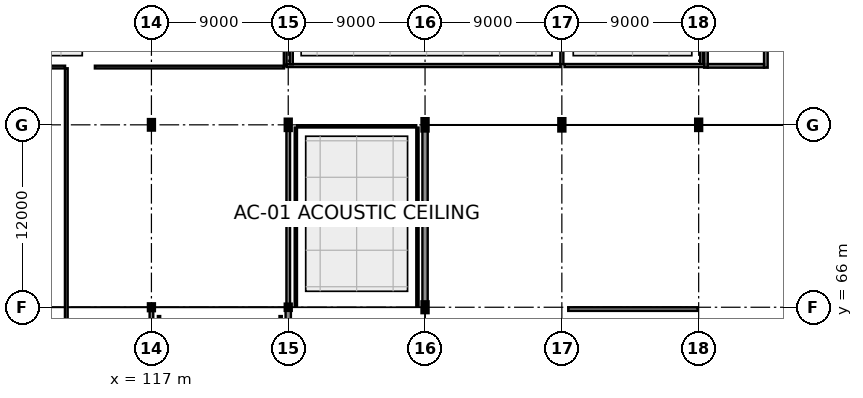
"""IFC4 building model, lengths in metres.
Left out: names, types, materials, properties, quantities, classifications, styles, units other than length and angle.
Written with IfcOpenShell. Run it as: python <this file> out.ifc"""

import sys

from ifc_helpers import new_model, si_unit, direction, frame, frame_2d, origin, origin_2d, place, context, subcontext, project, spatial, rectangle, i_section, extrude, element, fill, save


model = new_model("IFC4")
c1 = context("Model", 3, precision=1e-05, world=origin(), true_north=direction((0.0, 1.0)))
c2 = subcontext(c1, "Body", "Model", "MODEL_VIEW")
j1 = project(units=[si_unit("LENGTHUNIT", "METRE"), si_unit("PLANEANGLEUNIT", "RADIAN")], contexts=[c1])
p1 = place(None, origin())
s1 = spatial("IfcSite", under=j1, at=p1, CompositionType="ELEMENT")
p2 = place(p1, origin())
s2 = spatial("IfcBuilding", under=s1, at=p2, CompositionType="ELEMENT")
p3 = place(p2, origin())
s3 = spatial("IfcBuildingStorey", under=s2, at=p3, CompositionType="ELEMENT", Elevation=0.0)
p4 = place(p3, frame((117.0, 66.0, 0.0), z_axis=(0.0, 0.0, 1.0), x_axis=(1.0, 0.0, 0.0)))
e1 = element("IfcColumn", 1, at=p4, inside=s3, PredefinedType="COLUMN", context=c2, shape_type="SweptSolid", body=[
    extrude(i_section(OverallWidth=0.3, OverallDepth=0.36, WebThickness=0.012, FlangeThickness=0.022, at=origin_2d()), origin(), (0.0, 0.0, 1.0), 5.4),
])
p5 = place(p3, frame((117.0, 78.0, 0.0), z_axis=(0.0, 0.0, 1.0), x_axis=(1.0, 0.0, 0.0)))
e2 = element("IfcColumn", 2, at=p5, inside=s3, PredefinedType="COLUMN", context=c2, shape_type="SweptSolid", body=[
    extrude(i_section(OverallWidth=0.3, OverallDepth=0.6, WebThickness=0.015, FlangeThickness=0.03, at=origin_2d()), origin(), (0.0, 0.0, 1.0), 5.4),
])
p6 = place(p3, frame((126.0, 66.0, 0.0), z_axis=(0.0, 0.0, 1.0), x_axis=(0.0, 1.0, 0.0)))
e3 = element("IfcColumn", 3, at=p6, inside=s3, PredefinedType="COLUMN", context=c2, shape_type="SweptSolid", body=[
    extrude(i_section(OverallWidth=0.3, OverallDepth=0.32, WebThickness=0.011, FlangeThickness=0.021, at=origin_2d()), origin(), (0.0, 0.0, 1.0), 5.4),
])
p7 = place(p3, frame((126.0, 78.0, 0.0), z_axis=(0.0, 0.0, 1.0), x_axis=(1.0, 0.0, 0.0)))
e4 = element("IfcColumn", 4, at=p7, inside=s3, PredefinedType="COLUMN", context=c2, shape_type="SweptSolid", body=[
    extrude(i_section(OverallWidth=0.3, OverallDepth=0.65, WebThickness=0.016, FlangeThickness=0.031, at=origin_2d()), origin(), (0.0, 0.0, 1.0), 5.4),
])
p8 = place(p3, frame((135.0, 66.0, 0.0), z_axis=(0.0, 0.0, 1.0), x_axis=(1.0, 0.0, 0.0)))
e5 = element("IfcColumn", 5, at=p8, inside=s3, PredefinedType="COLUMN", context=c2, shape_type="SweptSolid", body=[
    extrude(i_section(OverallWidth=0.305, OverallDepth=0.62, WebThickness=0.021, FlangeThickness=0.04, at=origin_2d()), origin(), (0.0, 0.0, 1.0), 5.4),
])
for number, where, z_axis, x_axis in (
    (6, (135.0, 78.0, 0.0), (0.0, 0.0, 1.0), (1.0, 0.0, 0.0)),
    (7, (144.0, 78.0, 0.0), (0.0, 0.0, 1.0), (1.0, 0.0, 0.0)),
):
    element("IfcColumn", number, at=place(p3, frame(where, z_axis=z_axis, x_axis=x_axis)), inside=s3, PredefinedType="COLUMN", context=c2, shape_type="SweptSolid", body=[
        extrude(i_section(OverallWidth=0.304, OverallDepth=0.716, WebThickness=0.021, FlangeThickness=0.04, at=origin_2d()), origin(), (0.0, 0.0, 1.0), 5.4),
    ])
p9 = place(p3, frame((153.0, 78.0, 0.0), z_axis=(0.0, 0.0, 1.0), x_axis=(0.0, 1.0, 0.0)))
e8 = element("IfcColumn", 8, at=p9, inside=s3, PredefinedType="COLUMN", context=c2, shape_type="SweptSolid", body=[
    extrude(i_section(OverallWidth=0.3, OverallDepth=0.65, WebThickness=0.016, FlangeThickness=0.031, at=origin_2d()), origin(), (0.0, 0.0, 1.0), 5.4),
])
p10 = place(p3, frame((135.0, 66.308, 0.0), z_axis=(0.0, 0.0, 1.0), x_axis=(0.0, 1.0, 0.0)))
e9 = element("IfcWall", 9, at=p10, inside=s3, PredefinedType="SOLIDWALL", context=c2, shape_type="SweptSolid", body=[
    extrude(rectangle(XDim=11.336, YDim=0.35, at=frame_2d((5.668, 0.0))), origin(), (0.0, 0.0, 1.0), 4.545),
])
p11 = place(p10, frame((4.218, 0.0, 0.65)))
e10 = element("IfcOpeningElement", 10, at=p11, cuts=e9, PredefinedType="OPENING", context=c2, shape_type="SweptSolid", body=[
    extrude(rectangle(XDim=2.9, YDim=2.9, at=frame_2d((1.45, 1.45))), frame((0.0, 0.19, 0.0), z_axis=(0.0, -1.0, 0.0), x_axis=(1.0, 0.0, 0.0)), (0.0, 0.0, 1.0), 0.38),
])
p12 = place(p3, frame((126.0, 54.158, 0.0), z_axis=(0.0, 0.0, 1.0), x_axis=(0.0, 1.0, 0.0)))
e11 = element("IfcWall", 11, at=p12, inside=s3, PredefinedType="SOLIDWALL", context=c2, shape_type="SweptSolid", body=[
    extrude(rectangle(XDim=11.834, YDim=0.35, at=frame_2d((5.917, 0.0))), origin(), (0.0, 0.0, 1.0), 4.605),
])
p13 = place(p3, frame((144.42, 65.88, 0.0), z_axis=(0.0, 0.0, 1.0), x_axis=(1.0, 0.0, 0.0)))
e12 = element("IfcWall", 12, at=p13, inside=s3, PredefinedType="PARAPET", context=c2, shape_type="SweptSolid", body=[
    extrude(rectangle(XDim=8.52, YDim=0.24, at=frame_2d((4.26, 0.0))), origin(), (0.0, 0.0, 1.0), 0.9),
])
p14 = place(p3, frame((153.48, 81.76, 0.0), z_axis=(0.0, 0.0, 1.0), x_axis=(0.0, 1.0, 0.0)))
e13 = element("IfcWall", 13, at=p14, inside=s3, PredefinedType="SHEAR", context=c2, shape_type="SweptSolid", body=[
    extrude(rectangle(XDim=8.28, YDim=0.24, at=frame_2d((4.14, 0.0))), origin(), (0.0, 0.0, 1.0), 5.21),
])
p15 = place(p3, frame((157.42, 81.76, 0.0), z_axis=(0.0, 0.0, 1.0), x_axis=(0.0, 1.0, 0.0)))
e14 = element("IfcWall", 14, at=p15, inside=s3, PredefinedType="SHEAR", context=c2, shape_type="SweptSolid", body=[
    extrude(rectangle(XDim=8.28, YDim=0.24, at=frame_2d((4.14, 0.0))), origin(), (0.0, 0.0, 1.0), 5.21),
])
p16 = place(p15, frame((0.49, 0.0, 0.0)))
e15 = element("IfcOpeningElement", 15, at=p16, cuts=e14, PredefinedType="OPENING", context=c2, shape_type="SweptSolid", body=[
    extrude(rectangle(XDim=1.3, YDim=2.2, at=frame_2d((0.65, 1.1))), frame((0.0, 0.135, 0.0), z_axis=(0.0, -1.0, 0.0), x_axis=(1.0, 0.0, 0.0)), (0.0, 0.0, 1.0), 0.27),
])
p17 = place(p3, frame((153.6, 81.88, 0.0), z_axis=(0.0, 0.0, 1.0), x_axis=(1.0, 0.0, 0.0)))
e16 = element("IfcWall", 16, at=p17, inside=s3, PredefinedType="SHEAR", context=c2, shape_type="SweptSolid", body=[
    extrude(rectangle(XDim=3.7, YDim=0.24, at=frame_2d((1.85, 0.0))), origin(), (0.0, 0.0, 1.0), 5.21),
])
p18 = place(p3, frame((126.0, 66.008, 0.0), z_axis=(0.0, 0.0, 1.0), x_axis=(0.0, 1.0, 0.0)))
e17 = element("IfcWall", 17, at=p18, inside=s3, PredefinedType="SHEAR", context=c2, shape_type="SweptSolid", body=[
    extrude(rectangle(XDim=11.669, YDim=0.24, at=frame_2d((5.834, 0.0))), origin(), (0.0, 0.0, 1.0), 4.605),
])
p19 = place(p3, frame((117.0, 54.148, 0.0), z_axis=(0.0, 0.0, 1.0), x_axis=(0.0, 1.0, 0.0)))
e18 = element("IfcWall", 18, at=p19, inside=s3, PredefinedType="SHEAR", context=c2, shape_type="SweptSolid", body=[
    extrude(rectangle(XDim=11.674, YDim=0.24, at=frame_2d((5.837, 0.0))), origin(), (0.0, 0.0, 1.0), 4.675),
])
p20 = place(p3, frame((99.125, 81.8, 0.0), z_axis=(0.0, 0.0, 1.0), x_axis=(1.0, 0.0, 0.0)))
e19 = element("IfcWall", 19, at=p20, inside=s3, PredefinedType="PARTITIONING", context=c2, shape_type="SweptSolid", body=[
    extrude(rectangle(XDim=12.195, YDim=0.18, at=frame_2d((6.098, 0.0))), origin(), (0.0, 0.0, 1.0), 5.04),
])
p21 = place(p20, frame((5.248, 0.0, 0.0)))
e20 = element("IfcOpeningElement", 20, at=p21, cuts=e19, PredefinedType="OPENING", context=c2, shape_type="SweptSolid", body=[
    extrude(rectangle(XDim=1.7, YDim=2.4, at=frame_2d((0.85, 1.2))), frame((0.0, 0.105, 0.0), z_axis=(0.0, -1.0, 0.0), x_axis=(1.0, 0.0, 0.0)), (0.0, 0.0, 1.0), 0.21),
])
p22 = place(p20, frame((9.245, 0.0, 1.05)))
e21 = element("IfcOpeningElement", 21, at=p22, cuts=e19, PredefinedType="OPENING", context=c2, shape_type="SweptSolid", body=[
    extrude(rectangle(XDim=2.1, YDim=1.2, at=frame_2d((1.05, 0.6))), frame((0.0, 0.105, 0.0), z_axis=(0.0, -1.0, 0.0), x_axis=(1.0, 0.0, 0.0)), (0.0, 0.0, 1.0), 0.21),
])
p23 = place(p3, frame((111.4, 81.72, 0.0), z_axis=(0.0, 0.0, 1.0), x_axis=(0.0, -1.0, 0.0)))
e22 = element("IfcWall", 22, at=p23, inside=s3, PredefinedType="PARTITIONING", context=c2, shape_type="SweptSolid", body=[
    extrude(rectangle(XDim=23.64, YDim=0.18, at=frame_2d((11.82, 0.0))), origin(), (0.0, 0.0, 1.0), 5.04),
])
p24 = place(p23, frame((11.095, 0.0, 0.0)))
e23 = element("IfcOpeningElement", 23, at=p24, cuts=e22, PredefinedType="OPENING", context=c2, shape_type="SweptSolid", body=[
    extrude(rectangle(XDim=1.45, YDim=2.2, at=frame_2d((0.725, 1.1))), frame((0.0, 0.105, 0.0), z_axis=(0.0, -1.0, 0.0), x_axis=(1.0, 0.0, 0.0)), (0.0, 0.0, 1.0), 0.21),
])
p25 = place(p3, frame((125.72, 81.8, 0.0), z_axis=(0.0, 0.0, 1.0), x_axis=(-1.0, 0.0, 0.0)))
e24 = element("IfcWall", 24, at=p25, inside=s3, PredefinedType="PARTITIONING", context=c2, shape_type="SweptSolid", body=[
    extrude(rectangle(XDim=12.44, YDim=0.18, at=frame_2d((6.22, 0.0))), origin(), (0.0, 0.0, 1.0), 5.04),
])
p26 = place(p25, frame((5.495, 0.0, 0.0)))
e25 = element("IfcOpeningElement", 25, at=p26, cuts=e24, PredefinedType="OPENING", context=c2, shape_type="SweptSolid", body=[
    extrude(rectangle(XDim=1.45, YDim=2.2, at=frame_2d((0.725, 1.1))), frame((0.0, 0.105, 0.0), z_axis=(0.0, -1.0, 0.0), x_axis=(1.0, 0.0, 0.0)), (0.0, 0.0, 1.0), 0.21),
])
p27 = place(p3, frame((125.8, 83.92, 0.0), z_axis=(0.0, 0.0, 1.0), x_axis=(0.0, -1.0, 0.0)))
e26 = element("IfcWall", 26, at=p27, inside=s3, PredefinedType="PARTITIONING", context=c2, shape_type="SweptSolid", body=[
    extrude(rectangle(XDim=2.04, YDim=0.18, at=frame_2d((1.02, 0.0))), origin(), (0.0, 0.0, 1.0), 4.445),
])
p28 = place(p3, frame((144.0, 95.62, 0.0), z_axis=(0.0, 0.0, 1.0), x_axis=(0.0, -1.0, 0.0)))
e27 = element("IfcWall", 27, at=p28, inside=s3, PredefinedType="PARTITIONING", context=c2, shape_type="SweptSolid", body=[
    extrude(rectangle(XDim=13.64, YDim=0.2, at=frame_2d((6.82, 0.0))), origin(), (0.0, 0.0, 1.0), 4.405),
])
p29 = place(p3, frame((143.92, 81.9, 0.0), z_axis=(0.0, 0.0, 1.0), x_axis=(-1.0, 0.0, 0.0)))
e28 = element("IfcWall", 28, at=p29, inside=s3, PredefinedType="PARTITIONING", context=c2, shape_type="SweptSolid", body=[
    extrude(rectangle(XDim=18.035, YDim=0.2, at=frame_2d((9.018, 0.0))), origin(), (0.0, 0.0, 1.0), 5.04),
])
p30 = place(p29, frame((8.017, 0.0, 0.0)))
e29 = element("IfcOpeningElement", 29, at=p30, cuts=e28, PredefinedType="OPENING", context=c2, shape_type="SweptSolid", body=[
    extrude(rectangle(XDim=2.0, YDim=2.6, at=frame_2d((1.0, 1.3))), frame((0.0, 0.115, 0.0), z_axis=(0.0, -1.0, 0.0), x_axis=(1.0, 0.0, 0.0)), (0.0, 0.0, 1.0), 0.23),
])
p31 = place(p29, frame((15.385, 0.0, 1.05)))
e30 = element("IfcOpeningElement", 30, at=p31, cuts=e28, PredefinedType="OPENING", context=c2, shape_type="SweptSolid", body=[
    extrude(rectangle(XDim=1.8, YDim=1.1, at=frame_2d((0.9, 0.55))), frame((0.0, 0.115, 0.0), z_axis=(0.0, -1.0, 0.0), x_axis=(1.0, 0.0, 0.0)), (0.0, 0.0, 1.0), 0.23),
])
p32 = place(p3, frame((126.2, 81.98, 0.0), z_axis=(0.0, 0.0, 1.0), x_axis=(0.0, 1.0, 0.0)))
e31 = element("IfcWall", 31, at=p32, inside=s3, PredefinedType="PARTITIONING", context=c2, shape_type="SweptSolid", body=[
    extrude(rectangle(XDim=13.64, YDim=0.2, at=frame_2d((6.82, 0.0))), origin(), (0.0, 0.0, 1.0), 4.445),
])
p33 = place(p3, frame((153.2, 95.62, 0.0), z_axis=(0.0, 0.0, 1.0), x_axis=(0.0, -1.0, 0.0)))
e32 = element("IfcWall", 32, at=p33, inside=s3, PredefinedType="PARTITIONING", context=c2, shape_type="SweptSolid", body=[
    extrude(rectangle(XDim=13.64, YDim=0.2, at=frame_2d((6.82, 0.0))), origin(), (0.0, 0.0, 1.0), 4.305),
])
p34 = place(p3, frame((153.365, 81.9, 0.0), z_axis=(0.0, 0.0, 1.0), x_axis=(-1.0, 0.0, 0.0)))
e33 = element("IfcWall", 33, at=p34, inside=s3, PredefinedType="PARTITIONING", context=c2, shape_type="SweptSolid", body=[
    extrude(rectangle(XDim=9.185, YDim=0.2, at=frame_2d((4.593, 0.0))), origin(), (0.0, 0.0, 1.0), 5.04),
])
p35 = place(p34, frame((3.643, 0.0, 0.0)))
e34 = element("IfcOpeningElement", 34, at=p35, cuts=e33, PredefinedType="OPENING", context=c2, shape_type="SweptSolid", body=[
    extrude(rectangle(XDim=1.9, YDim=2.5, at=frame_2d((0.95, 1.25))), frame((0.0, 0.115, 0.0), z_axis=(0.0, -1.0, 0.0), x_axis=(1.0, 0.0, 0.0)), (0.0, 0.0, 1.0), 0.23),
])
p36 = place(p34, frame((6.835, 0.0, 1.05)))
e35 = element("IfcOpeningElement", 35, at=p36, cuts=e33, PredefinedType="OPENING", context=c2, shape_type="SweptSolid", body=[
    extrude(rectangle(XDim=1.5, YDim=1.1, at=frame_2d((0.75, 0.55))), frame((0.0, 0.115, 0.0), z_axis=(0.0, -1.0, 0.0), x_axis=(1.0, 0.0, 0.0)), (0.0, 0.0, 1.0), 0.23),
])
p37 = place(p3, frame((126.5, 66.075, 0.0), z_axis=(0.0, 0.0, 1.0), x_axis=(0.0, 1.0, 0.0)))
e36 = element("IfcWall", 36, at=p37, inside=s3, PredefinedType="PARTITIONING", context=c2, shape_type="SweptSolid", body=[
    extrude(rectangle(XDim=11.745, YDim=0.15, at=frame_2d((5.873, 0.0))), origin(), (0.0, 0.0, 1.0), 5.04),
])
p38 = place(p3, frame((126.58, 77.9, 0.0), z_axis=(0.0, 0.0, 1.0), x_axis=(1.0, 0.0, 0.0)))
e37 = element("IfcWall", 37, at=p38, inside=s3, PredefinedType="PARTITIONING", context=c2, shape_type="SweptSolid", body=[
    extrude(rectangle(XDim=7.84, YDim=0.15, at=frame_2d((3.92, 0.0))), origin(), (0.0, 0.0, 1.0), 4.185),
])
p39 = place(p38, frame((3.395, 0.0, 0.0)))
e38 = element("IfcOpeningElement", 38, at=p39, cuts=e37, PredefinedType="OPENING", context=c2, shape_type="SweptSolid", body=[
    extrude(rectangle(XDim=1.05, YDim=2.25, at=frame_2d((0.525, 1.125))), frame((0.0, 0.09, 0.0), z_axis=(0.0, -1.0, 0.0), x_axis=(1.0, 0.0, 0.0)), (0.0, 0.0, 1.0), 0.18),
])
p40 = place(p38, frame((5.79, 0.0, 1.05)))
e39 = element("IfcOpeningElement", 39, at=p40, cuts=e37, PredefinedType="OPENING", context=c2, shape_type="SweptSolid", body=[
    extrude(rectangle(XDim=1.2, YDim=1.0, at=frame_2d((0.6, 0.5))), frame((0.0, 0.09, 0.0), z_axis=(0.0, -1.0, 0.0), x_axis=(1.0, 0.0, 0.0)), (0.0, 0.0, 1.0), 0.18),
])
p41 = place(p3, frame((134.5, 77.82, 0.0), z_axis=(0.0, 0.0, 1.0), x_axis=(0.0, -1.0, 0.0)))
e40 = element("IfcWall", 40, at=p41, inside=s3, PredefinedType="PARTITIONING", context=c2, shape_type="SweptSolid", body=[
    extrude(rectangle(XDim=11.745, YDim=0.15, at=frame_2d((5.873, 0.0))), origin(), (0.0, 0.0, 1.0), 5.04),
])
for number, where, z_axis, x_axis in (
    (41, (117.5, 54.58, 0.0), (0.0, 0.0, 1.0), (0.0, 1.0, 0.0)),
    (42, (125.5, 65.42, 0.0), (0.0, 0.0, 1.0), (0.0, -1.0, 0.0)),
):
    element("IfcWall", number, at=place(p3, frame(where, z_axis=z_axis, x_axis=x_axis)), inside=s3, PredefinedType="PARTITIONING", context=c2, shape_type="SweptSolid", body=[
        extrude(rectangle(XDim=10.84, YDim=0.15, at=frame_2d((5.42, 0.0))), origin(), (0.0, 0.0, 1.0), 5.04),
    ])
p42 = place(p11, origin())
e43 = element("IfcWindow", 43, at=p42, inside=s3, PartitioningType="SINGLE_PANEL", PredefinedType="WINDOW", context=c2, shape_type="SweptSolid", body=[
    extrude(rectangle(XDim=2.9, YDim=2.9, at=frame_2d((1.45, 1.45))), frame((0.0, 0.03, 0.0), z_axis=(0.0, -1.0, 0.0), x_axis=(1.0, 0.0, 0.0)), (0.0, 0.0, 1.0), 0.06),
])
fill(e10, e43)
p43 = place(p16, frame((1.3, 0.0, 0.0), z_axis=(0.0, 0.0, 1.0), x_axis=(-1.0, 0.0, 0.0)))
e44 = element("IfcDoor", 44, at=p43, inside=s3, OperationType="SINGLE_SWING_LEFT", PredefinedType="DOOR", context=c2, shape_type="SweptSolid", body=[
    extrude(rectangle(XDim=1.3, YDim=2.2, at=frame_2d((0.65, 1.1))), frame((0.0, 0.025, 0.0), z_axis=(0.0, -1.0, 0.0), x_axis=(1.0, 0.0, 0.0)), (0.0, 0.0, 1.0), 0.05),
])
fill(e15, e44)
p44 = place(p24, origin())
e45 = element("IfcDoor", 45, at=p44, inside=s3, OperationType="DOUBLE_DOOR_SINGLE_SWING", PredefinedType="DOOR", context=c2, shape_type="SweptSolid", body=[
    extrude(rectangle(XDim=1.45, YDim=2.2, at=frame_2d((0.725, 1.1))), frame((0.0, 0.025, 0.0), z_axis=(0.0, -1.0, 0.0), x_axis=(1.0, 0.0, 0.0)), (0.0, 0.0, 1.0), 0.05),
])
fill(e23, e45)
p45 = place(p26, origin())
e46 = element("IfcDoor", 46, at=p45, inside=s3, OperationType="DOUBLE_DOOR_SINGLE_SWING", PredefinedType="DOOR", context=c2, shape_type="SweptSolid", body=[
    extrude(rectangle(XDim=1.45, YDim=2.2, at=frame_2d((0.725, 1.1))), frame((0.0, 0.025, 0.0), z_axis=(0.0, -1.0, 0.0), x_axis=(1.0, 0.0, 0.0)), (0.0, 0.0, 1.0), 0.05),
])
fill(e25, e46)
p46 = place(p30, frame((2.0, 0.0, 0.0), z_axis=(0.0, 0.0, 1.0), x_axis=(-1.0, 0.0, 0.0)))
e47 = element("IfcDoor", 47, at=p46, inside=s3, OperationType="DOUBLE_DOOR_SINGLE_SWING", PredefinedType="DOOR", context=c2, shape_type="SweptSolid", body=[
    extrude(rectangle(XDim=2.0, YDim=2.6, at=frame_2d((1.0, 1.3))), frame((0.0, 0.025, 0.0), z_axis=(0.0, -1.0, 0.0), x_axis=(1.0, 0.0, 0.0)), (0.0, 0.0, 1.0), 0.05),
])
fill(e29, e47)
p47 = place(p31, origin())
e48 = element("IfcWindow", 48, at=p47, inside=s3, PartitioningType="SINGLE_PANEL", PredefinedType="WINDOW", context=c2, shape_type="SweptSolid", body=[
    extrude(rectangle(XDim=1.8, YDim=1.1, at=frame_2d((0.9, 0.55))), frame((0.0, 0.03, 0.0), z_axis=(0.0, -1.0, 0.0), x_axis=(1.0, 0.0, 0.0)), (0.0, 0.0, 1.0), 0.06),
])
fill(e30, e48)
p48 = place(p35, origin())
e49 = element("IfcDoor", 49, at=p48, inside=s3, OperationType="DOUBLE_DOOR_SINGLE_SWING", PredefinedType="DOOR", context=c2, shape_type="SweptSolid", body=[
    extrude(rectangle(XDim=1.9, YDim=2.5, at=frame_2d((0.95, 1.25))), frame((0.0, 0.025, 0.0), z_axis=(0.0, -1.0, 0.0), x_axis=(1.0, 0.0, 0.0)), (0.0, 0.0, 1.0), 0.05),
])
fill(e34, e49)
p49 = place(p36, origin())
e50 = element("IfcWindow", 50, at=p49, inside=s3, PartitioningType="SINGLE_PANEL", PredefinedType="WINDOW", context=c2, shape_type="SweptSolid", body=[
    extrude(rectangle(XDim=1.5, YDim=1.1, at=frame_2d((0.75, 0.55))), frame((0.0, 0.03, 0.0), z_axis=(0.0, -1.0, 0.0), x_axis=(1.0, 0.0, 0.0)), (0.0, 0.0, 1.0), 0.06),
])
fill(e35, e50)
p50 = place(p39, frame((1.05, 0.0, 0.0), z_axis=(0.0, 0.0, 1.0), x_axis=(-1.0, 0.0, 0.0)))
e51 = element("IfcDoor", 51, at=p50, inside=s3, OperationType="SINGLE_SWING_RIGHT", PredefinedType="DOOR", context=c2, shape_type="SweptSolid", body=[
    extrude(rectangle(XDim=1.05, YDim=2.25, at=frame_2d((0.525, 1.125))), frame((0.0, 0.025, 0.0), z_axis=(0.0, -1.0, 0.0), x_axis=(1.0, 0.0, 0.0)), (0.0, 0.0, 1.0), 0.05),
])
fill(e38, e51)
p51 = place(p40, origin())
e52 = element("IfcWindow", 52, at=p51, inside=s3, PartitioningType="SINGLE_PANEL", PredefinedType="WINDOW", context=c2, shape_type="SweptSolid", body=[
    extrude(rectangle(XDim=1.2, YDim=1.0, at=frame_2d((0.6, 0.5))), frame((0.0, 0.03, 0.0), z_axis=(0.0, -1.0, 0.0), x_axis=(1.0, 0.0, 0.0)), (0.0, 0.0, 1.0), 0.06),
])
fill(e39, e52)
save(model, sys.argv[1])
